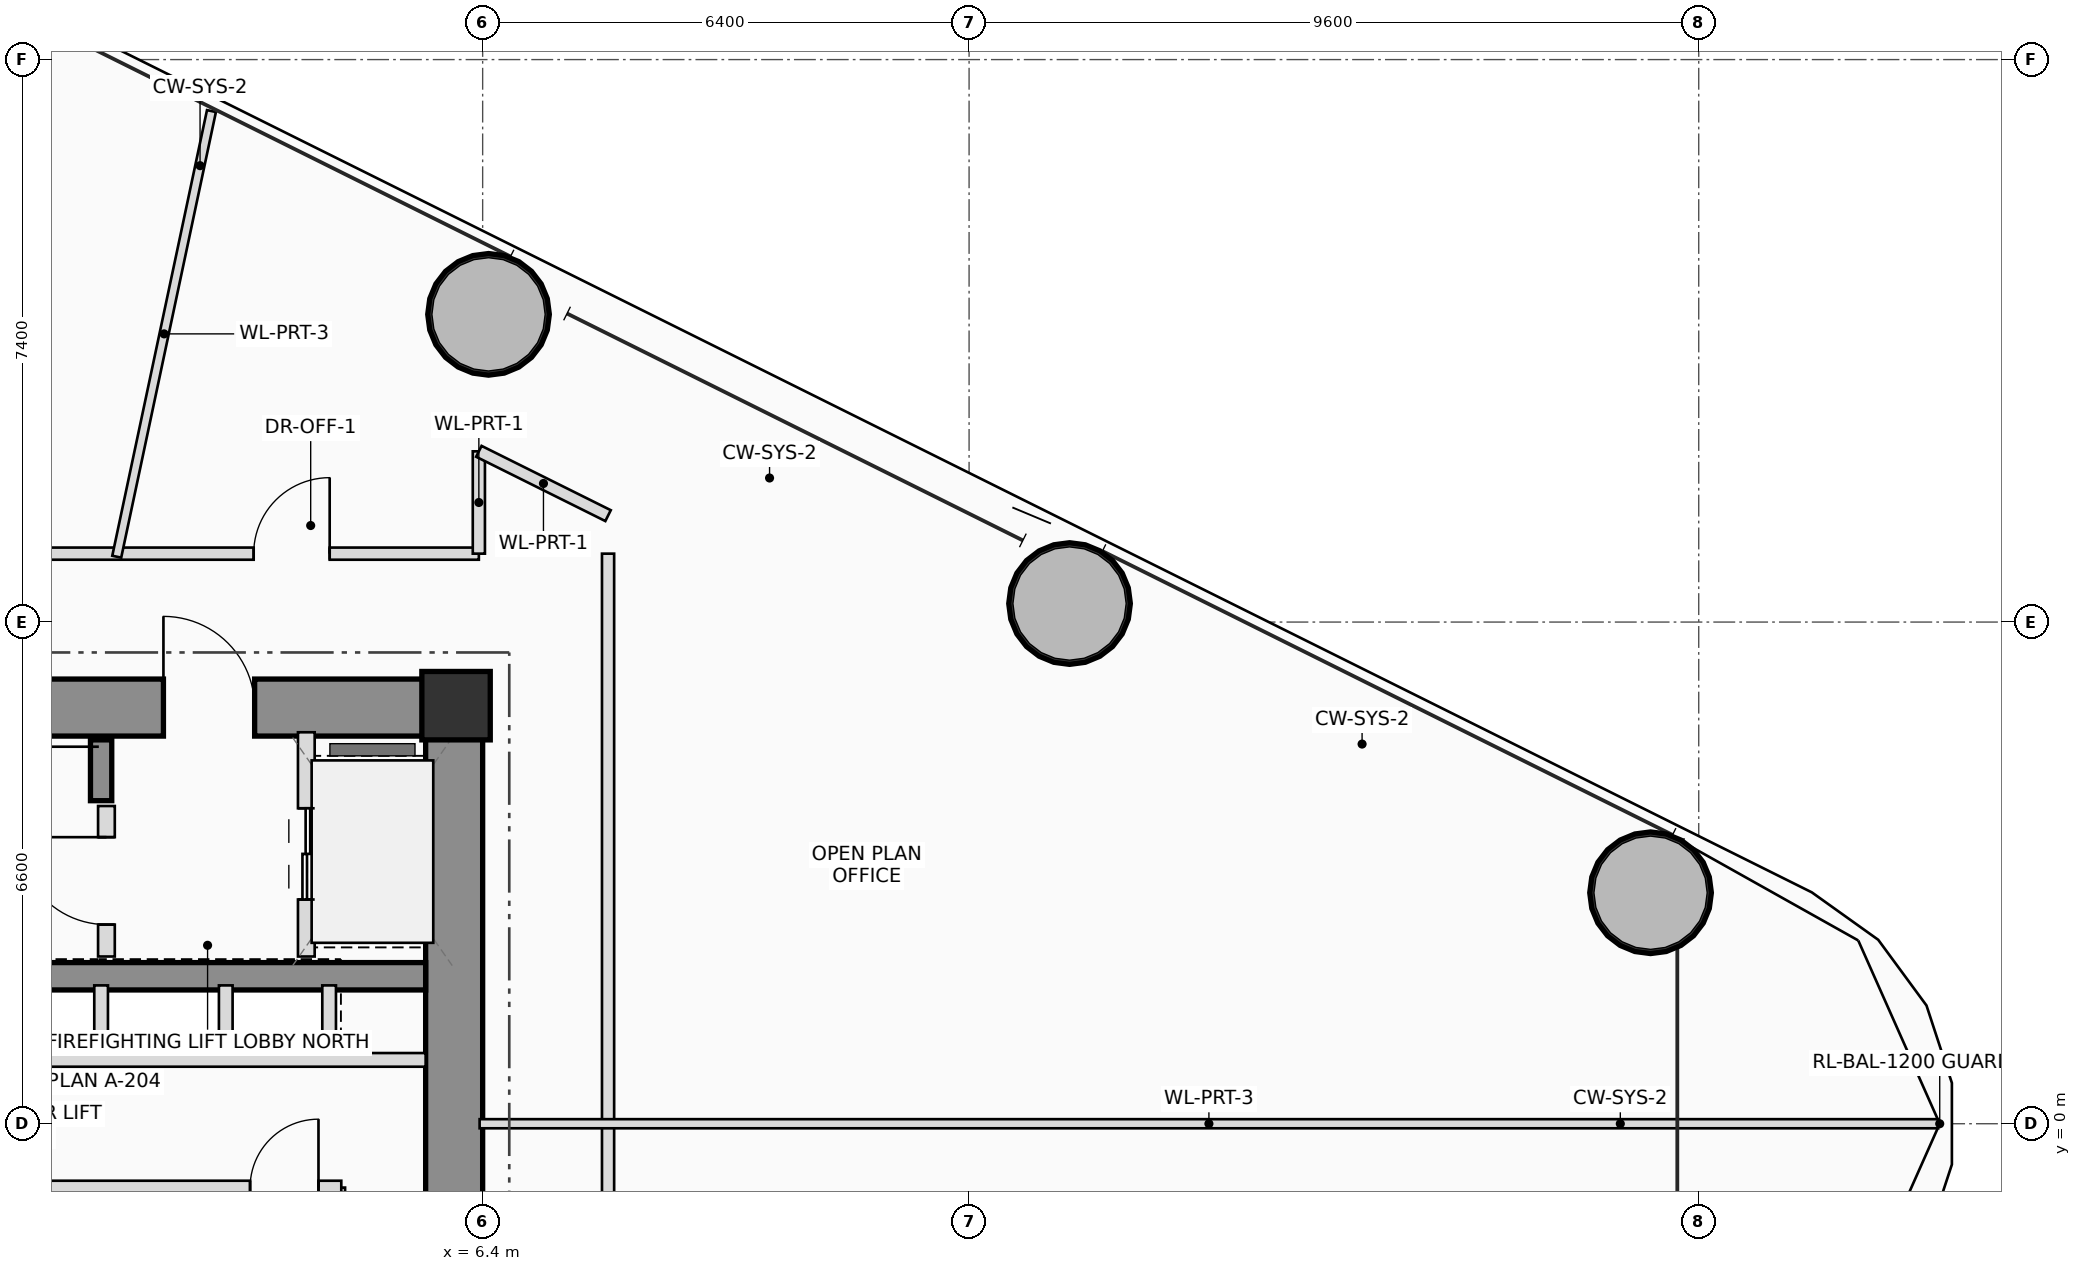
"""IFC4 building model, lengths in metres.
Left out: names, types, materials, properties, quantities, classifications, styles, units other than length and angle.
Written with IfcOpenShell. Run it as: python <this file> out.ifc"""

import sys

from ifc_helpers import new_model, si_unit, direction, frame, frame_2d, origin, origin_2d, place, context, subcontext, project, spatial, rectangle, hollow_circle, extrude, source, transform, mapped, element, fill, save


model = new_model("IFC4")
c1 = context("Model", 3, precision=1e-05, world=origin(), true_north=direction((0.0, 1.0)))
c2 = subcontext(c1, "Body", "Model", "MODEL_VIEW")
j1 = project(units=[si_unit("LENGTHUNIT", "METRE"), si_unit("PLANEANGLEUNIT", "RADIAN")], contexts=[c1])
p1 = place(None, origin())
s1 = spatial("IfcSite", under=j1, at=p1, CompositionType="ELEMENT")
p2 = place(p1, origin())
s2 = spatial("IfcBuilding", under=s1, at=p2, CompositionType="ELEMENT")
p3 = place(p2, frame((0.0, 0.0, 27.5)))
s3 = spatial("IfcBuildingStorey", under=s2, at=p3, CompositionType="ELEMENT", Elevation=27.5)
m1 = source(origin(), c2, "Body", "SweptSolid", [
    extrude(rectangle(XDim=0.9, YDim=0.9, at=origin_2d()), origin(), (0.0, 0.0, 1.0), 3.7),
])
p4 = place(p3, frame((6.05, 5.5, 0.0), z_axis=(0.0, 0.0, 1.0), x_axis=(1.0, 0.0, 0.0)))
e1 = element("IfcColumn", 1, at=p4, inside=s3, PredefinedType="COLUMN", context=c2, shape_type="MappedRepresentation", body=[
    mapped(m1, transform((0.0, 0.0, 0.0), scale=1.0)),
])
p5 = place(p3, frame((-6.4, 5.475, 0.0), z_axis=(0.0, 0.0, 1.0), x_axis=(1.0, 0.0, 0.0)))
e2 = element("IfcWall", 2, at=p5, inside=s3, PredefinedType="SHEAR", context=c2, shape_type="SweptSolid", body=[
    extrude(rectangle(XDim=12.8, YDim=0.75, at=frame_2d((6.4, 0.0))), origin(), (0.0, 0.0, 1.0), 3.7),
])
p6 = place(p5, frame((8.6, 0.0, 0.0)))
e3 = element("IfcOpeningElement", 3, at=p6, cuts=e2, PredefinedType="OPENING", context=c2, shape_type="SweptSolid", body=[
    extrude(rectangle(XDim=1.2, YDim=2.2, at=frame_2d((0.6, 1.1))), frame((0.0, 0.385, 0.0), z_axis=(0.0, -1.0, 0.0), x_axis=(1.0, 0.0, 0.0)), (0.0, 0.0, 1.0), 0.77),
])
p7 = place(p3, frame((6.025, -5.1, 0.0), z_axis=(0.0, 0.0, 1.0), x_axis=(0.0, 1.0, 0.0)))
e4 = element("IfcWall", 4, at=p7, inside=s3, PredefinedType="SHEAR", context=c2, shape_type="SweptSolid", body=[
    extrude(rectangle(XDim=10.2, YDim=0.75, at=frame_2d((5.1, 0.0))), origin(), (0.0, 0.0, 1.0), 3.7),
])
p8 = place(p3, frame((-5.65, 1.94, 0.0), z_axis=(0.0, 0.0, 1.0), x_axis=(1.0, 0.0, 0.0)))
e5 = element("IfcWall", 5, at=p8, inside=s3, PredefinedType="SHEAR", context=c2, shape_type="SweptSolid", body=[
    extrude(rectangle(XDim=11.3, YDim=0.36, at=frame_2d((5.65, 0.0))), origin(), (0.0, 0.0, 1.0), 3.7),
])
p9 = place(p3, frame((1.38, 4.25, 0.0), z_axis=(0.0, 0.0, 1.0), x_axis=(0.0, 1.0, 0.0)))
e6 = element("IfcWall", 6, at=p9, inside=s3, PredefinedType="SHEAR", context=c2, shape_type="SweptSolid", body=[
    extrude(rectangle(XDim=0.8, YDim=0.28, at=frame_2d((0.4, 0.0))), origin(), (0.0, 0.0, 1.0), 3.7),
])
m2 = source(origin(), c2, "Body", "SweptSolid", [
    extrude(hollow_circle(Radius=0.8, WallThickness=0.055, at=origin_2d()), origin(), (0.0, 0.0, 1.0), 3.7),
])
for number, where, z_axis, x_axis in (
    (7, (21.766, 3.039, 0.0), (0.0, 0.0, 1.0), (1.0, 0.0, 0.0)),
    (8, (14.122, 6.844, 0.0), (0.0, 0.0, 1.0), (1.0, 0.0, 0.0)),
    (9, (6.477, 10.648, 0.0), (0.0, 0.0, 1.0), (1.0, 0.0, 0.0)),
):
    element("IfcColumn", number, at=place(p3, frame(where, z_axis=z_axis, x_axis=x_axis)), inside=s3, PredefinedType="COLUMN", context=c2, shape_type="MappedRepresentation", body=[
        mapped(m2, transform((0.0, 0.0, 0.0), scale=1.0)),
    ])
p10 = place(p3, frame((1.45, 2.2, 0.0), z_axis=(0.0, 0.0, 1.0), x_axis=(0.0, 1.0, 0.0)))
e10 = element("IfcWall", 10, at=p10, inside=s3, PredefinedType="PLUMBINGWALL", context=c2, shape_type="SweptSolid", body=[
    extrude(rectangle(XDim=1.98, YDim=0.22, at=frame_2d((0.99, 0.0))), origin(), (0.0, 0.0, 1.0), 3.495),
])
p11 = place(p10, frame((0.42, 0.0, 0.0)))
e11 = element("IfcOpeningElement", 11, at=p11, cuts=e10, PredefinedType="OPENING", context=c2, shape_type="SweptSolid", body=[
    extrude(rectangle(XDim=1.15, YDim=2.15, at=frame_2d((0.575, 1.075))), frame((0.0, 0.12, 0.0), z_axis=(0.0, -1.0, 0.0), x_axis=(1.0, 0.0, 0.0)), (0.0, 0.0, 1.0), 0.24),
])
p12 = place(p3, frame((4.08, 2.2, 0.0), z_axis=(0.0, 0.0, 1.0), x_axis=(0.0, 1.0, 0.0)))
e12 = element("IfcWall", 12, at=p12, inside=s3, PredefinedType="PLUMBINGWALL", context=c2, shape_type="SweptSolid", body=[
    extrude(rectangle(XDim=2.95, YDim=0.22, at=frame_2d((1.475, 0.0))), origin(), (0.0, 0.0, 1.0), 3.495),
])
p13 = place(p12, frame((0.75, 0.0, 0.0)))
e13 = element("IfcOpeningElement", 13, at=p13, cuts=e12, PredefinedType="OPENING", context=c2, shape_type="SweptSolid", body=[
    extrude(rectangle(XDim=1.2, YDim=2.25, at=frame_2d((0.6, 1.125))), frame((0.0, 0.12, 0.0), z_axis=(0.0, -1.0, 0.0), x_axis=(1.0, 0.0, 0.0)), (0.0, 0.0, 1.0), 0.24),
])
for number, where, z_axis, x_axis in (
    (14, (1.38, 0.84, 0.0), (0.0, 0.0, 1.0), (0.0, 1.0, 0.0)),
    (15, (1.38, -1.82, 0.0), (0.0, 0.0, 1.0), (0.0, 1.0, 0.0)),
    (16, (3.02, 0.84, 0.0), (0.0, 0.0, 1.0), (0.0, 1.0, 0.0)),
    (17, (4.38, 0.84, 0.0), (0.0, 0.0, 1.0), (0.0, 1.0, 0.0)),
    (18, (3.02, -1.82, 0.0), (0.0, 0.0, 1.0), (0.0, 1.0, 0.0)),
):
    element("IfcWall", number, at=place(p3, frame(where, z_axis=z_axis, x_axis=x_axis)), inside=s3, PredefinedType="PLUMBINGWALL", context=c2, shape_type="SweptSolid", body=[
        extrude(rectangle(XDim=0.98, YDim=0.18, at=frame_2d((0.49, 0.0))), origin(), (0.0, 0.0, 1.0), 3.495),
    ])
p14 = place(p3, frame((4.54, -1.82, 0.0), z_axis=(0.0, 0.0, 1.0), x_axis=(0.0, 1.0, 0.0)))
e19 = element("IfcWall", 19, at=p14, inside=s3, PredefinedType="PARTITIONING", context=c2, shape_type="SweptSolid", body=[
    extrude(rectangle(XDim=0.98, YDim=0.1, at=frame_2d((0.49, 0.0))), origin(), (0.0, 0.0, 1.0), 3.495),
])
p15 = place(p3, frame((-5.68, 0.84, 0.0), z_axis=(0.0, 0.0, 1.0), x_axis=(1.0, 0.0, 0.0)))
e20 = element("IfcWall", 20, at=p15, inside=s3, PredefinedType="PLUMBINGWALL", context=c2, shape_type="SweptSolid", body=[
    extrude(rectangle(XDim=11.33, YDim=0.18, at=frame_2d((5.665, 0.0))), origin(), (0.0, 0.0, 1.0), 3.495),
])
p16 = place(p15, frame((0.43, 0.0, 0.0)))
e21 = element("IfcOpeningElement", 21, at=p16, cuts=e20, PredefinedType="OPENING", context=c2, shape_type="SweptSolid", body=[
    extrude(rectangle(XDim=1.1, YDim=2.2, at=frame_2d((0.55, 1.1))), frame((0.0, 0.1, 0.0), z_axis=(0.0, -1.0, 0.0), x_axis=(1.0, 0.0, 0.0)), (0.0, 0.0, 1.0), 0.2),
])
p17 = place(p15, frame((2.13, 0.0, 0.0)))
e22 = element("IfcOpeningElement", 22, at=p17, cuts=e20, PredefinedType="OPENING", context=c2, shape_type="SweptSolid", body=[
    extrude(rectangle(XDim=1.1, YDim=2.2, at=frame_2d((0.55, 1.1))), frame((0.0, 0.1, 0.0), z_axis=(0.0, -1.0, 0.0), x_axis=(1.0, 0.0, 0.0)), (0.0, 0.0, 1.0), 0.2),
])
p18 = place(p3, frame((-5.68, -0.84, 0.0), z_axis=(0.0, 0.0, 1.0), x_axis=(1.0, 0.0, 0.0)))
e23 = element("IfcWall", 23, at=p18, inside=s3, PredefinedType="PLUMBINGWALL", context=c2, shape_type="SweptSolid", body=[
    extrude(rectangle(XDim=10.22, YDim=0.18, at=frame_2d((5.11, 0.0))), origin(), (0.0, 0.0, 1.0), 3.495),
])
p19 = place(p18, frame((0.43, 0.0, 0.0)))
e24 = element("IfcOpeningElement", 24, at=p19, cuts=e23, PredefinedType="OPENING", context=c2, shape_type="SweptSolid", body=[
    extrude(rectangle(XDim=1.1, YDim=2.2, at=frame_2d((0.55, 1.1))), frame((0.0, 0.1, 0.0), z_axis=(0.0, -1.0, 0.0), x_axis=(1.0, 0.0, 0.0)), (0.0, 0.0, 1.0), 0.2),
])
p20 = place(p18, frame((2.13, 0.0, 0.0)))
e25 = element("IfcOpeningElement", 25, at=p20, cuts=e23, PredefinedType="OPENING", context=c2, shape_type="SweptSolid", body=[
    extrude(rectangle(XDim=1.1, YDim=2.2, at=frame_2d((0.55, 1.1))), frame((0.0, 0.1, 0.0), z_axis=(0.0, -1.0, 0.0), x_axis=(1.0, 0.0, 0.0)), (0.0, 0.0, 1.0), 0.2),
])
p21 = place(p18, frame((9.02, 0.0, 0.0)))
e26 = element("IfcOpeningElement", 26, at=p21, cuts=e23, PredefinedType="OPENING", context=c2, shape_type="SweptSolid", body=[
    extrude(rectangle(XDim=0.9, YDim=2.05, at=frame_2d((0.45, 1.025))), frame((0.0, 0.1, 0.0), z_axis=(0.0, -1.0, 0.0), x_axis=(1.0, 0.0, 0.0)), (0.0, 0.0, 1.0), 0.2),
])
p22 = place(p3, frame((-6.35, 7.5, 0.0), z_axis=(0.0, 0.0, 1.0), x_axis=(1.0, 0.0, 0.0)))
e27 = element("IfcWall", 27, at=p22, inside=s3, PredefinedType="PARTITIONING", context=c2, shape_type="SweptSolid", body=[
    extrude(rectangle(XDim=12.7, YDim=0.16, at=frame_2d((6.35, 0.0))), origin(), (0.0, 0.0, 1.0), 2.8),
])
p23 = place(p22, frame((9.737, 0.0, 0.0)))
e28 = element("IfcOpeningElement", 28, at=p23, cuts=e27, PredefinedType="OPENING", context=c2, shape_type="SweptSolid", body=[
    extrude(rectangle(XDim=1.0, YDim=2.25, at=frame_2d((0.5, 1.125))), frame((0.0, 0.09, 0.0), z_axis=(0.0, -1.0, 0.0), x_axis=(1.0, 0.0, 0.0)), (0.0, 0.0, 1.0), 0.18),
])
p24 = place(p3, frame((6.35, 7.5, 0.0), z_axis=(0.0, 0.0, 1.0), x_axis=(0.0, 1.0, 0.0)))
e29 = element("IfcWall", 29, at=p24, inside=s3, PredefinedType="PARTITIONING", context=c2, shape_type="SweptSolid", body=[
    extrude(rectangle(XDim=1.346, YDim=0.16, at=frame_2d((0.673, 0.0))), origin(), (0.0, 0.0, 1.0), 2.8),
])
p25 = place(p3, frame((6.35, 8.846, 0.0), z_axis=(0.0, 0.0, 1.0), x_axis=(0.895274181873, -0.445515588136, 0.0)))
e30 = element("IfcWall", 30, at=p25, inside=s3, PredefinedType="PARTITIONING", context=c2, shape_type="SweptSolid", body=[
    extrude(rectangle(XDim=1.899, YDim=0.16, at=frame_2d((0.949, 0.0))), origin(), (0.0, 0.0, 1.0), 2.8),
])
for number, where, z_axis, x_axis in (
    (31, (8.05, 7.5, 0.0), (0.0, 0.0, 1.0), (0.0, -1.0, 0.0)),
    (32, (8.05, -0.02, 0.0), (0.0, 0.0, 1.0), (0.0, -1.0, 0.0)),
):
    element("IfcWall", number, at=place(p3, frame(where, z_axis=z_axis, x_axis=x_axis)), inside=s3, PredefinedType="PARTITIONING", context=c2, shape_type="SweptSolid", body=[
        extrude(rectangle(XDim=7.48, YDim=0.16, at=frame_2d((3.74, 0.0))), origin(), (0.0, 0.0, 1.0), 2.8),
    ])
p26 = place(p3, frame((6.36, 0.0, 0.0), z_axis=(0.0, 0.0, 1.0), x_axis=(1.0, 0.0, 0.0)))
e33 = element("IfcWall", 33, at=p26, inside=s3, PredefinedType="PARTITIONING", context=c2, shape_type="SweptSolid", body=[
    extrude(rectangle(XDim=19.191, YDim=0.12, at=frame_2d((9.595, 0.0))), origin(), (0.0, 0.0, 1.0), 2.96),
])
p27 = place(p3, frame((1.586, 7.46, 0.0), z_axis=(0.0, 0.0, 1.0), x_axis=(0.207898702609, 0.978150361373, 0.0)))
e34 = element("IfcWall", 34, at=p27, inside=s3, PredefinedType="PARTITIONING", context=c2, shape_type="SweptSolid", body=[
    extrude(rectangle(XDim=5.994, YDim=0.12, at=frame_2d((2.997, 0.0))), origin(), (0.0, 0.0, 1.0), 2.96),
])
p28 = place(p6, origin())
e35 = element("IfcDoor", 35, at=p28, inside=s3, OperationType="SINGLE_SWING_LEFT", PredefinedType="DOOR", context=c2, shape_type="SweptSolid", body=[
    extrude(rectangle(XDim=1.2, YDim=2.2, at=frame_2d((0.6, 1.1))), frame((0.0, 0.025, 0.0), z_axis=(0.0, -1.0, 0.0), x_axis=(1.0, 0.0, 0.0)), (0.0, 0.0, 1.0), 0.05),
])
fill(e3, e35)
p29 = place(p11, origin())
e36 = element("IfcDoor", 36, at=p29, inside=s3, OperationType="SINGLE_SWING_RIGHT", PredefinedType="DOOR", context=c2, shape_type="SweptSolid", body=[
    extrude(rectangle(XDim=1.15, YDim=2.15, at=frame_2d((0.575, 1.075))), frame((0.0, 0.025, 0.0), z_axis=(0.0, -1.0, 0.0), x_axis=(1.0, 0.0, 0.0)), (0.0, 0.0, 1.0), 0.05),
])
fill(e11, e36)
p30 = place(p13, origin())
e37 = element("IfcDoor", 37, at=p30, inside=s3, OperationType="DOUBLE_DOOR_SLIDING", PredefinedType="DOOR", context=c2, shape_type="SweptSolid", body=[
    extrude(rectangle(XDim=1.2, YDim=2.25, at=frame_2d((0.6, 1.125))), frame((0.0, 0.025, 0.0), z_axis=(0.0, -1.0, 0.0), x_axis=(1.0, 0.0, 0.0)), (0.0, 0.0, 1.0), 0.05),
])
fill(e13, e37)
p31 = place(p21, origin())
e38 = element("IfcDoor", 38, at=p31, inside=s3, OperationType="SINGLE_SWING_RIGHT", PredefinedType="DOOR", context=c2, shape_type="SweptSolid", body=[
    extrude(rectangle(XDim=0.9, YDim=2.05, at=frame_2d((0.45, 1.025))), frame((0.0, 0.025, 0.0), z_axis=(0.0, -1.0, 0.0), x_axis=(1.0, 0.0, 0.0)), (0.0, 0.0, 1.0), 0.05),
])
fill(e26, e38)
p32 = place(p23, origin())
e39 = element("IfcDoor", 39, at=p32, inside=s3, OperationType="SINGLE_SWING_RIGHT", PredefinedType="DOOR", context=c2, shape_type="SweptSolid", body=[
    extrude(rectangle(XDim=1.0, YDim=2.25, at=frame_2d((0.5, 1.125))), frame((0.0, 0.025, 0.0), z_axis=(0.0, -1.0, 0.0), x_axis=(1.0, 0.0, 0.0)), (0.0, 0.0, 1.0), 0.05),
])
fill(e28, e39)
save(model, sys.argv[1])
